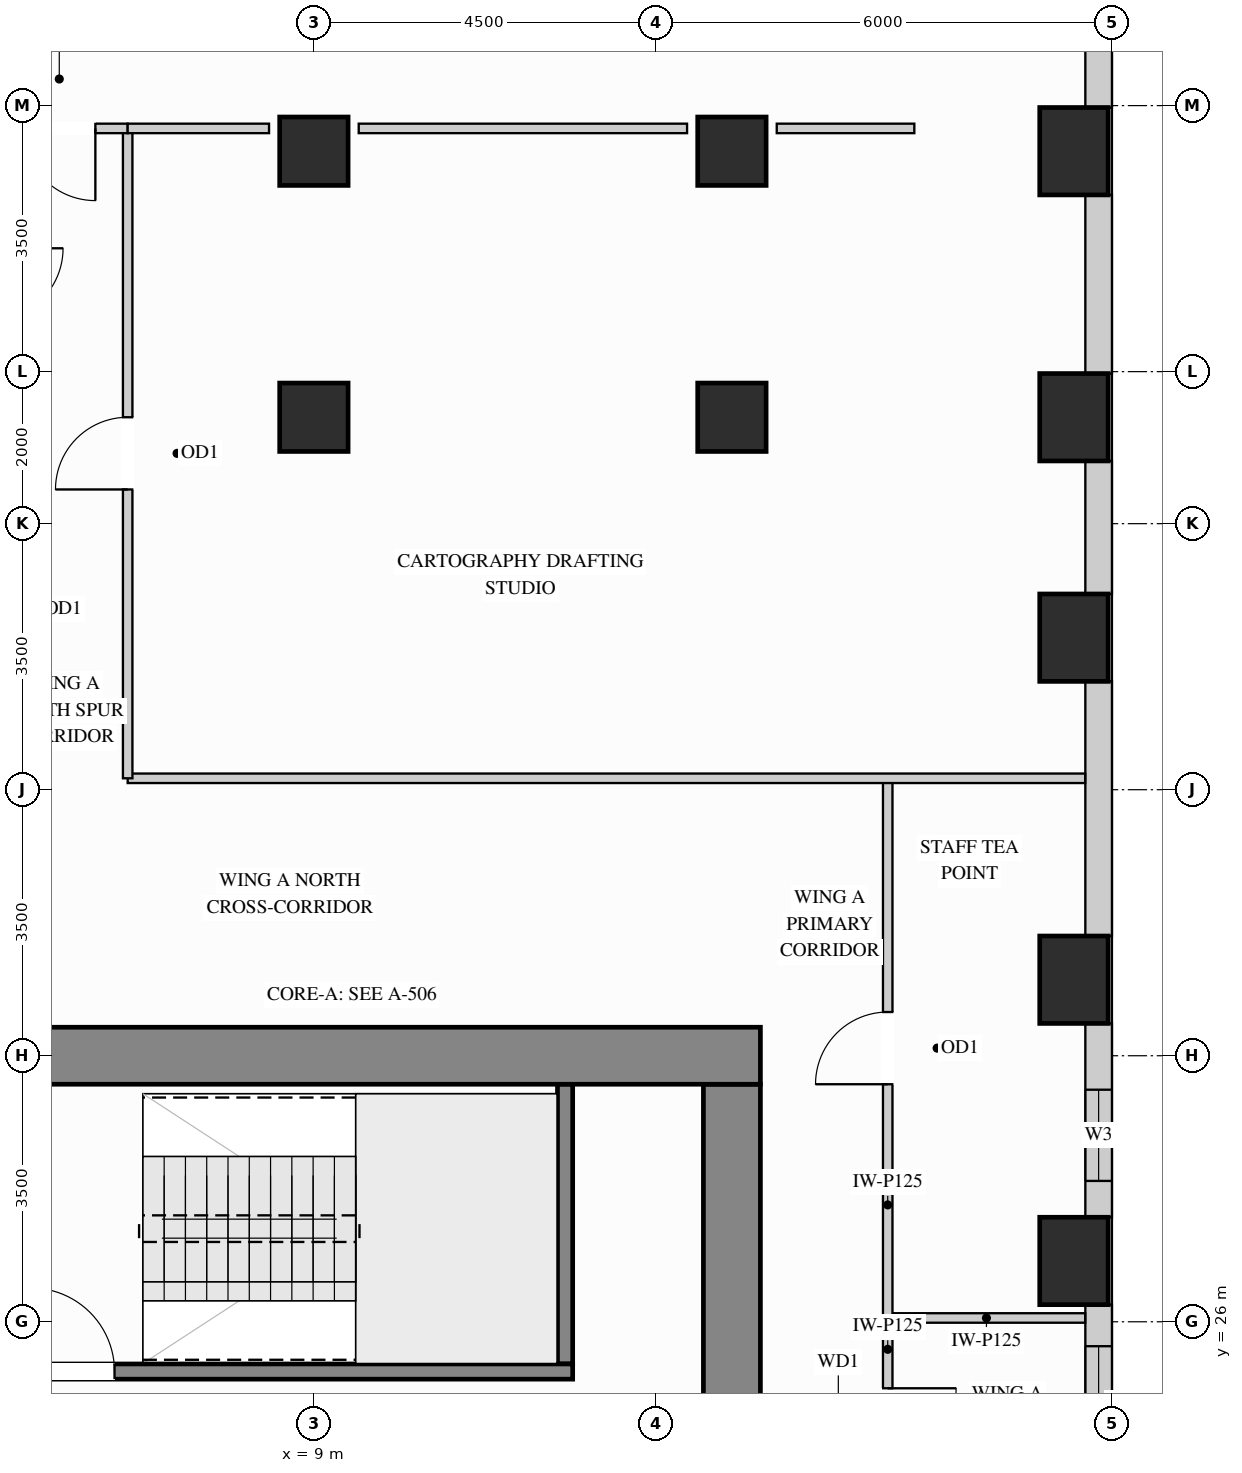
"""IFC4 building model, lengths in metres.
Left out: names, types, materials, properties, quantities, classifications, styles, units other than length and angle.
Written with IfcOpenShell. Run it as: python <this file> out.ifc"""

import sys

from ifc_helpers import new_model, si_unit, direction, frame, frame_2d, origin, origin_2d, place, context, subcontext, project, spatial, rectangle, extrude, source, transform, mapped, element, fill, save


model = new_model("IFC4")
c1 = context("Model", 3, precision=1e-05, world=origin(), true_north=direction((0.0, 1.0)))
c2 = subcontext(c1, "Body", "Model", "MODEL_VIEW")
j1 = project(units=[si_unit("LENGTHUNIT", "METRE"), si_unit("PLANEANGLEUNIT", "RADIAN")], contexts=[c1])
p1 = place(None, origin())
s1 = spatial("IfcSite", under=j1, at=p1, CompositionType="ELEMENT")
p2 = place(p1, origin())
s2 = spatial("IfcBuilding", under=s1, at=p2, CompositionType="ELEMENT")
p3 = place(p2, frame((0.0, 0.0, 84.6)))
s3 = spatial("IfcBuildingStorey", under=s2, at=p3, CompositionType="ELEMENT", Elevation=84.6)
m1 = source(origin(), c2, "Body", "SweptSolid", [
    extrude(rectangle(XDim=0.9, YDim=0.9, at=origin_2d()), origin(), (0.0, 0.0, 1.0), 3.38),
])
for number, where, z_axis, x_axis in (
    (1, (14.5, 37.9, 0.0), (0.0, 0.0, 1.0), (1.0, 0.0, 0.0)),
    (2, (14.5, 41.4, 0.0), (0.0, 0.0, 1.0), (1.0, 0.0, 0.0)),
    (3, (9.0, 37.9, 0.0), (0.0, 0.0, 1.0), (1.0, 0.0, 0.0)),
    (4, (9.0, 41.4, 0.0), (0.0, 0.0, 1.0), (1.0, 0.0, 0.0)),
):
    element("IfcColumn", number, at=place(p3, frame(where, z_axis=z_axis, x_axis=x_axis)), inside=s3, PredefinedType="COLUMN", context=c2, shape_type="MappedRepresentation", body=[
        mapped(m1, transform((0.0, 0.0, 0.0), x_axis=(1.0, 0.0, 0.0), y_axis=(0.0, 1.0, 0.0), z_axis=(0.0, 0.0, 1.0))),
    ])
m2 = source(origin(), c2, "Body", "SweptSolid", [
    extrude(rectangle(XDim=0.9, YDim=1.15, at=origin_2d()), origin(), (0.0, 0.0, 1.0), 3.38),
])
for number, where, z_axis, x_axis in (
    (5, (19.0, 26.8, 0.0), (0.0, 0.0, 1.0), (1.0, 0.0, 0.0)),
    (6, (19.0, 30.5, 0.0), (0.0, 0.0, 1.0), (1.0, 0.0, 0.0)),
    (7, (19.0, 35.0, 0.0), (0.0, 0.0, 1.0), (1.0, 0.0, 0.0)),
    (8, (19.0, 37.9, 0.0), (0.0, 0.0, 1.0), (1.0, 0.0, 0.0)),
    (9, (19.0, 41.4, 0.0), (0.0, 0.0, 1.0), (1.0, 0.0, 0.0)),
):
    element("IfcColumn", number, at=place(p3, frame(where, z_axis=z_axis, x_axis=x_axis)), inside=s3, PredefinedType="COLUMN", context=c2, shape_type="MappedRepresentation", body=[
        mapped(m2, transform((0.0, 0.0, 0.0), x_axis=(1.0, 0.0, 0.0), y_axis=(0.0, 1.0, 0.0), z_axis=(0.0, 0.0, 1.0))),
    ])
m3 = source(origin(), c2, "Body", "SweptSolid", [
    extrude(rectangle(XDim=8.245, YDim=0.75, at=frame_2d((4.123, 0.0))), origin(), (0.0, 0.0, 1.0), 3.38),
])
p4 = place(p3, frame((14.5, 20.88, 0.0), z_axis=(0.0, 0.0, 1.0), x_axis=(0.0, 1.0, 0.0)))
e10 = element("IfcWall", 10, at=p4, inside=s3, PredefinedType="SHEAR", context=c2, shape_type="MappedRepresentation", body=[
    mapped(m3, transform((0.0, 0.0, 0.0), x_axis=(1.0, 0.0, 0.0), y_axis=(0.0, 1.0, 0.0), z_axis=(0.0, 0.0, 1.0))),
])
m4 = source(origin(), c2, "Body", "SweptSolid", [
    extrude(rectangle(XDim=10.75, YDim=0.75, at=frame_2d((5.375, 0.0))), origin(), (0.0, 0.0, 1.0), 3.38),
])
p5 = place(p3, frame((4.125, 29.5, 0.0), z_axis=(0.0, 0.0, 1.0), x_axis=(1.0, 0.0, 0.0)))
e11 = element("IfcWall", 11, at=p5, inside=s3, PredefinedType="SHEAR", context=c2, shape_type="MappedRepresentation", body=[
    mapped(m4, transform((0.0, 0.0, 0.0), x_axis=(1.0, 0.0, 0.0), y_axis=(0.0, 1.0, 0.0), z_axis=(0.0, 0.0, 1.0))),
])
p6 = place(p3, frame((19.325, 23.073, 0.0), z_axis=(0.0, 0.0, 1.0), x_axis=(0.0, 1.0, 0.0)))
e12 = element("IfcWall", 12, at=p6, inside=s3, PredefinedType="SOLIDWALL", context=c2, shape_type="SweptSolid", body=[
    extrude(rectangle(XDim=3.154, YDim=0.35, at=frame_2d((1.577, 0.0))), origin(), (0.0, 0.0, 1.0), 2.519),
])
p7 = place(p6, frame((1.105, 0.0, 0.78)))
e13 = element("IfcOpeningElement", 13, at=p7, cuts=e12, PredefinedType="OPENING", context=c2, shape_type="SweptSolid", body=[
    extrude(rectangle(XDim=1.5, YDim=1.559, at=frame_2d((0.75, 0.78))), frame((0.0, 0.185, 0.0), z_axis=(0.0, -1.0, 0.0), x_axis=(1.0, 0.0, 0.0)), (0.0, 0.0, 1.0), 0.37),
])
p8 = place(p3, frame((19.325, 27.373, 0.0), z_axis=(0.0, 0.0, 1.0), x_axis=(0.0, 1.0, 0.0)))
e14 = element("IfcWall", 14, at=p8, inside=s3, PredefinedType="SOLIDWALL", context=c2, shape_type="SweptSolid", body=[
    extrude(rectangle(XDim=2.554, YDim=0.35, at=frame_2d((1.277, 0.0))), origin(), (0.0, 0.0, 1.0), 2.519),
])
p9 = place(p8, frame((0.48, 0.0, 0.78)))
e15 = element("IfcOpeningElement", 15, at=p9, cuts=e14, PredefinedType="OPENING", context=c2, shape_type="SweptSolid", body=[
    extrude(rectangle(XDim=1.2, YDim=1.559, at=frame_2d((0.6, 0.78))), frame((0.0, 0.185, 0.0), z_axis=(0.0, -1.0, 0.0), x_axis=(1.0, 0.0, 0.0)), (0.0, 0.0, 1.0), 0.37),
])
m5 = source(origin(), c2, "Body", "SweptSolid", [
    extrude(rectangle(XDim=3.354, YDim=0.35, at=frame_2d((1.677, 0.0))), origin(), (0.0, 0.0, 1.0), 2.519),
])
p10 = place(p3, frame((19.325, 31.073, 0.0), z_axis=(0.0, 0.0, 1.0), x_axis=(0.0, 1.0, 0.0)))
e16 = element("IfcWall", 16, at=p10, inside=s3, PredefinedType="SOLIDWALL", context=c2, shape_type="MappedRepresentation", body=[
    mapped(m5, transform((0.0, 0.0, 0.0), x_axis=(1.0, 0.0, 0.0), y_axis=(0.0, 1.0, 0.0), z_axis=(0.0, 0.0, 1.0))),
])
m6 = source(origin(), c2, "Body", "SweptSolid", [
    extrude(rectangle(XDim=1.754, YDim=0.35, at=frame_2d((0.877, 0.0))), origin(), (0.0, 0.0, 1.0), 2.519),
])
p11 = place(p3, frame((19.325, 35.573, 0.0), z_axis=(0.0, 0.0, 1.0), x_axis=(0.0, 1.0, 0.0)))
e17 = element("IfcWall", 17, at=p11, inside=s3, PredefinedType="SOLIDWALL", context=c2, shape_type="MappedRepresentation", body=[
    mapped(m6, transform((0.0, 0.0, 0.0), x_axis=(1.0, 0.0, 0.0), y_axis=(0.0, 1.0, 0.0), z_axis=(0.0, 0.0, 1.0))),
])
m7 = source(origin(), c2, "Body", "SweptSolid", [
    extrude(rectangle(XDim=2.354, YDim=0.35, at=frame_2d((1.177, 0.0))), origin(), (0.0, 0.0, 1.0), 2.519),
])
p12 = place(p3, frame((19.325, 38.473, 0.0), z_axis=(0.0, 0.0, 1.0), x_axis=(0.0, 1.0, 0.0)))
e18 = element("IfcWall", 18, at=p12, inside=s3, PredefinedType="SOLIDWALL", context=c2, shape_type="MappedRepresentation", body=[
    mapped(m7, transform((0.0, 0.0, 0.0), x_axis=(1.0, 0.0, 0.0), y_axis=(0.0, 1.0, 0.0), z_axis=(0.0, 0.0, 1.0))),
])
m8 = source(origin(), c2, "Body", "SweptSolid", [
    extrude(rectangle(XDim=1.179, YDim=0.35, at=frame_2d((0.59, 0.0))), origin(), (0.0, 0.0, 1.0), 3.365),
])
p13 = place(p3, frame((19.325, 41.973, 0.0), z_axis=(0.0, 0.0, 1.0), x_axis=(0.0, 1.0, 0.0)))
e19 = element("IfcWall", 19, at=p13, inside=s3, PredefinedType="SOLIDWALL", context=c2, shape_type="MappedRepresentation", body=[
    mapped(m8, transform((0.0, 0.0, 0.0), x_axis=(1.0, 0.0, 0.0), y_axis=(0.0, 1.0, 0.0), z_axis=(0.0, 0.0, 1.0))),
])
m9 = source(origin(), c2, "Body", "SweptSolid", [
    extrude(rectangle(XDim=2.598, YDim=0.125, at=frame_2d((1.299, 0.0))), origin(), (0.0, 0.0, 1.0), 3.365),
])
p14 = place(p3, frame((16.55, 26.05, 0.0), z_axis=(0.0, 0.0, 1.0), x_axis=(1.0, 0.0, 0.0)))
e20 = element("IfcWall", 20, at=p14, inside=s3, PredefinedType="PARTITIONING", context=c2, shape_type="MappedRepresentation", body=[
    mapped(m9, transform((0.0, 0.0, 0.0), x_axis=(1.0, 0.0, 0.0), y_axis=(0.0, 1.0, 0.0), z_axis=(0.0, 0.0, 1.0))),
])
p15 = place(p3, frame((16.55, 26.05, 0.0), z_axis=(0.0, 0.0, 1.0), x_axis=(0.0, 1.0, 0.0)))
e21 = element("IfcWall", 21, at=p15, inside=s3, PredefinedType="PARTITIONING", context=c2, shape_type="SweptSolid", body=[
    extrude(rectangle(XDim=7.1, YDim=0.125, at=frame_2d((3.55, 0.0))), origin(), (0.0, 0.0, 1.0), 3.365),
])
p16 = place(p15, frame((3.075, 0.0, 0.0)))
e22 = element("IfcOpeningElement", 22, at=p16, cuts=e21, PredefinedType="OPENING", context=c2, shape_type="SweptSolid", body=[
    extrude(rectangle(XDim=0.95, YDim=2.15, at=frame_2d((0.475, 1.075))), frame((0.0, 0.073, 0.0), z_axis=(0.0, -1.0, 0.0), x_axis=(1.0, 0.0, 0.0)), (0.0, 0.0, 1.0), 0.145),
])
p17 = place(p3, frame((16.55, 23.35, 0.0), z_axis=(0.0, 0.0, 1.0), x_axis=(0.0, 1.0, 0.0)))
e23 = element("IfcWall", 23, at=p17, inside=s3, PredefinedType="PARTITIONING", context=c2, shape_type="SweptSolid", body=[
    extrude(rectangle(XDim=2.7, YDim=0.125, at=frame_2d((1.35, 0.0))), origin(), (0.0, 0.0, 1.0), 3.365),
])
p18 = place(p17, frame((0.875, 0.0, 0.0)))
e24 = element("IfcOpeningElement", 24, at=p18, cuts=e23, PredefinedType="OPENING", context=c2, shape_type="SweptSolid", body=[
    extrude(rectangle(XDim=0.9, YDim=2.15, at=frame_2d((0.45, 1.075))), frame((0.0, 0.073, 0.0), z_axis=(0.0, -1.0, 0.0), x_axis=(1.0, 0.0, 0.0)), (0.0, 0.0, 1.0), 0.145),
])
m10 = source(origin(), c2, "Body", "SweptSolid", [
    extrude(rectangle(XDim=12.598, YDim=0.125, at=frame_2d((6.299, 0.0))), origin(), (0.0, 0.0, 1.0), 3.365),
])
p19 = place(p3, frame((6.55, 33.15, 0.0), z_axis=(0.0, 0.0, 1.0), x_axis=(1.0, 0.0, 0.0)))
e25 = element("IfcWall", 25, at=p19, inside=s3, PredefinedType="PARTITIONING", context=c2, shape_type="MappedRepresentation", body=[
    mapped(m10, transform((0.0, 0.0, 0.0), x_axis=(1.0, 0.0, 0.0), y_axis=(0.0, 1.0, 0.0), z_axis=(0.0, 0.0, 1.0))),
])
p20 = place(p3, frame((6.55, 33.15, 0.0), z_axis=(0.0, 0.0, 1.0), x_axis=(0.0, 1.0, 0.0)))
e26 = element("IfcWall", 26, at=p20, inside=s3, PredefinedType="PARTITIONING", context=c2, shape_type="SweptSolid", body=[
    extrude(rectangle(XDim=8.55, YDim=0.125, at=frame_2d((4.275, 0.0))), origin(), (0.0, 0.0, 1.0), 3.365),
])
p21 = place(p20, frame((3.8, 0.0, 0.0)))
e27 = element("IfcOpeningElement", 27, at=p21, cuts=e26, PredefinedType="OPENING", context=c2, shape_type="SweptSolid", body=[
    extrude(rectangle(XDim=0.95, YDim=2.15, at=frame_2d((0.475, 1.075))), frame((0.0, 0.073, 0.0), z_axis=(0.0, -1.0, 0.0), x_axis=(1.0, 0.0, 0.0)), (0.0, 0.0, 1.0), 0.145),
])
p22 = place(p3, frame((4.75, 41.7, 0.0), z_axis=(0.0, 0.0, 1.0), x_axis=(1.0, 0.0, 0.0)))
e28 = element("IfcWall", 28, at=p22, inside=s3, PredefinedType="PARTITIONING", context=c2, shape_type="SweptSolid", body=[
    extrude(rectangle(XDim=1.8, YDim=0.125, at=frame_2d((0.9, 0.0))), origin(), (0.0, 0.0, 1.0), 3.365),
])
p23 = place(p22, frame((0.425, 0.0, 0.0)))
e29 = element("IfcOpeningElement", 29, at=p23, cuts=e28, PredefinedType="OPENING", context=c2, shape_type="SweptSolid", body=[
    extrude(rectangle(XDim=0.95, YDim=2.15, at=frame_2d((0.475, 1.075))), frame((0.0, 0.073, 0.0), z_axis=(0.0, -1.0, 0.0), x_axis=(1.0, 0.0, 0.0)), (0.0, 0.0, 1.0), 0.145),
])
m11 = source(origin(), c2, "Body", "SweptSolid", [
    extrude(rectangle(XDim=1.86, YDim=0.125, at=frame_2d((0.93, 0.0))), origin(), (0.0, 0.0, 1.0), 3.365),
])
p24 = place(p3, frame((6.55, 41.7, 0.0), z_axis=(0.0, 0.0, 1.0), x_axis=(1.0, 0.0, 0.0)))
e30 = element("IfcWall", 30, at=p24, inside=s3, PredefinedType="PARTITIONING", context=c2, shape_type="MappedRepresentation", body=[
    mapped(m11, transform((0.0, 0.0, 0.0), x_axis=(1.0, 0.0, 0.0), y_axis=(0.0, 1.0, 0.0), z_axis=(0.0, 0.0, 1.0))),
])
m12 = source(origin(), c2, "Body", "SweptSolid", [
    extrude(rectangle(XDim=4.32, YDim=0.125, at=frame_2d((2.16, 0.0))), origin(), (0.0, 0.0, 1.0), 3.365),
])
p25 = place(p3, frame((9.59, 41.7, 0.0), z_axis=(0.0, 0.0, 1.0), x_axis=(1.0, 0.0, 0.0)))
e31 = element("IfcWall", 31, at=p25, inside=s3, PredefinedType="PARTITIONING", context=c2, shape_type="MappedRepresentation", body=[
    mapped(m12, transform((0.0, 0.0, 0.0), x_axis=(1.0, 0.0, 0.0), y_axis=(0.0, 1.0, 0.0), z_axis=(0.0, 0.0, 1.0))),
])
m13 = source(origin(), c2, "Body", "SweptSolid", [
    extrude(rectangle(XDim=1.81, YDim=0.125, at=frame_2d((0.905, 0.0))), origin(), (0.0, 0.0, 1.0), 3.365),
])
p26 = place(p3, frame((15.09, 41.7, 0.0), z_axis=(0.0, 0.0, 1.0), x_axis=(1.0, 0.0, 0.0)))
e32 = element("IfcWall", 32, at=p26, inside=s3, PredefinedType="PARTITIONING", context=c2, shape_type="MappedRepresentation", body=[
    mapped(m13, transform((0.0, 0.0, 0.0), x_axis=(1.0, 0.0, 0.0), y_axis=(0.0, 1.0, 0.0), z_axis=(0.0, 0.0, 1.0))),
])
m14 = source(origin(), c2, "Body", "SweptSolid", [
    extrude(rectangle(XDim=3.678, YDim=0.2, at=frame_2d((1.839, 0.0))), origin(), (0.0, 0.0, 1.0), 3.38),
])
p27 = place(p3, frame((12.305, 25.445, 0.0), z_axis=(0.0, 0.0, 1.0), x_axis=(0.0, 1.0, 0.0)))
e33 = element("IfcWall", 33, at=p27, inside=s3, PredefinedType="SHEAR", context=c2, shape_type="MappedRepresentation", body=[
    mapped(m14, transform((0.0, 0.0, 0.0), x_axis=(1.0, 0.0, 0.0), y_axis=(0.0, 1.0, 0.0), z_axis=(0.0, 0.0, 1.0))),
])
p28 = place(p3, frame((4.877, 25.345, 0.0), z_axis=(0.0, 0.0, 1.0), x_axis=(1.0, 0.0, 0.0)))
e34 = element("IfcWall", 34, at=p28, inside=s3, PredefinedType="SHEAR", context=c2, shape_type="SweptSolid", body=[
    extrude(rectangle(XDim=7.528, YDim=0.2, at=frame_2d((3.764, 0.0))), origin(), (0.0, 0.0, 1.0), 3.38),
])
p29 = place(p28, frame((0.4, 0.0, 0.0)))
e35 = element("IfcOpeningElement", 35, at=p29, cuts=e34, PredefinedType="OPENING", context=c2, shape_type="SweptSolid", body=[
    extrude(rectangle(XDim=1.1, YDim=2.15, at=frame_2d((0.55, 1.075))), frame((0.0, 0.11, 0.0), z_axis=(0.0, -1.0, 0.0), x_axis=(1.0, 0.0, 0.0)), (0.0, 0.0, 1.0), 0.22),
])
m15 = source(origin(), c2, "Body", "SweptSolid", [
    extrude(rectangle(XDim=0.95, YDim=2.15, at=frame_2d((0.475, 1.075))), frame((0.0, 0.025, 0.0), z_axis=(0.0, -1.0, 0.0), x_axis=(1.0, 0.0, 0.0)), (0.0, 0.0, 1.0), 0.05),
])
p30 = place(p16, origin())
e36 = element("IfcDoor", 36, at=p30, inside=s3, OperationType="SINGLE_SWING_LEFT", PredefinedType="DOOR", context=c2, shape_type="MappedRepresentation", body=[
    mapped(m15, transform((0.0, 0.0, 0.0), x_axis=(1.0, 0.0, 0.0), y_axis=(0.0, 1.0, 0.0), z_axis=(0.0, 0.0, 1.0))),
])
fill(e22, e36)
p31 = place(p21, origin())
e37 = element("IfcDoor", 37, at=p31, inside=s3, OperationType="SINGLE_SWING_LEFT", PredefinedType="DOOR", context=c2, shape_type="MappedRepresentation", body=[
    mapped(m15, transform((0.0, 0.0, 0.0), x_axis=(1.0, 0.0, 0.0), y_axis=(0.0, 1.0, 0.0), z_axis=(0.0, 0.0, 1.0))),
])
fill(e27, e37)
p32 = place(p23, origin())
e38 = element("IfcDoor", 38, at=p32, inside=s3, OperationType="SINGLE_SWING_RIGHT", PredefinedType="DOOR", context=c2, shape_type="MappedRepresentation", body=[
    mapped(m15, transform((0.0, 0.0, 0.0), x_axis=(1.0, 0.0, 0.0), y_axis=(0.0, 1.0, 0.0), z_axis=(0.0, 0.0, 1.0))),
])
fill(e29, e38)
m16 = source(origin(), c2, "Body", "SweptSolid", [
    extrude(rectangle(XDim=1.1, YDim=2.15, at=frame_2d((0.55, 1.075))), frame((0.0, 0.025, 0.0), z_axis=(0.0, -1.0, 0.0), x_axis=(1.0, 0.0, 0.0)), (0.0, 0.0, 1.0), 0.05),
])
p33 = place(p29, origin())
e39 = element("IfcDoor", 39, at=p33, inside=s3, OperationType="SINGLE_SWING_LEFT", PredefinedType="DOOR", context=c2, shape_type="MappedRepresentation", body=[
    mapped(m16, transform((0.0, 0.0, 0.0), x_axis=(1.0, 0.0, 0.0), y_axis=(0.0, 1.0, 0.0), z_axis=(0.0, 0.0, 1.0))),
])
fill(e35, e39)
m17 = source(origin(), c2, "Body", "SweptSolid", [
    extrude(rectangle(XDim=0.9, YDim=2.15, at=frame_2d((0.45, 1.075))), frame((0.0, 0.025, 0.0), z_axis=(0.0, -1.0, 0.0), x_axis=(1.0, 0.0, 0.0)), (0.0, 0.0, 1.0), 0.05),
])
p34 = place(p18, origin())
e40 = element("IfcDoor", 40, at=p34, inside=s3, OperationType="SINGLE_SWING_RIGHT", PredefinedType="DOOR", context=c2, shape_type="MappedRepresentation", body=[
    mapped(m17, transform((0.0, 0.0, 0.0), x_axis=(1.0, 0.0, 0.0), y_axis=(0.0, 1.0, 0.0), z_axis=(0.0, 0.0, 1.0))),
])
fill(e24, e40)
m18 = source(origin(), c2, "Body", "SweptSolid", [
    extrude(rectangle(XDim=1.2, YDim=1.559, at=frame_2d((0.6, 0.78))), frame((0.0, 0.03, 0.0), z_axis=(0.0, -1.0, 0.0), x_axis=(1.0, 0.0, 0.0)), (0.0, 0.0, 1.0), 0.06),
])
p35 = place(p9, origin())
e41 = element("IfcWindow", 41, at=p35, inside=s3, PartitioningType="SINGLE_PANEL", PredefinedType="WINDOW", context=c2, shape_type="MappedRepresentation", body=[
    mapped(m18, transform((0.0, 0.0, 0.0), x_axis=(1.0, 0.0, 0.0), y_axis=(0.0, 1.0, 0.0), z_axis=(0.0, 0.0, 1.0))),
])
fill(e15, e41)
m19 = source(origin(), c2, "Body", "SweptSolid", [
    extrude(rectangle(XDim=1.5, YDim=1.559, at=frame_2d((0.75, 0.78))), frame((0.0, 0.03, 0.0), z_axis=(0.0, -1.0, 0.0), x_axis=(1.0, 0.0, 0.0)), (0.0, 0.0, 1.0), 0.06),
])
p36 = place(p7, origin())
e42 = element("IfcWindow", 42, at=p36, inside=s3, PartitioningType="SINGLE_PANEL", PredefinedType="WINDOW", context=c2, shape_type="MappedRepresentation", body=[
    mapped(m19, transform((0.0, 0.0, 0.0), x_axis=(1.0, 0.0, 0.0), y_axis=(0.0, 1.0, 0.0), z_axis=(0.0, 0.0, 1.0))),
])
fill(e13, e42)
save(model, sys.argv[1])
